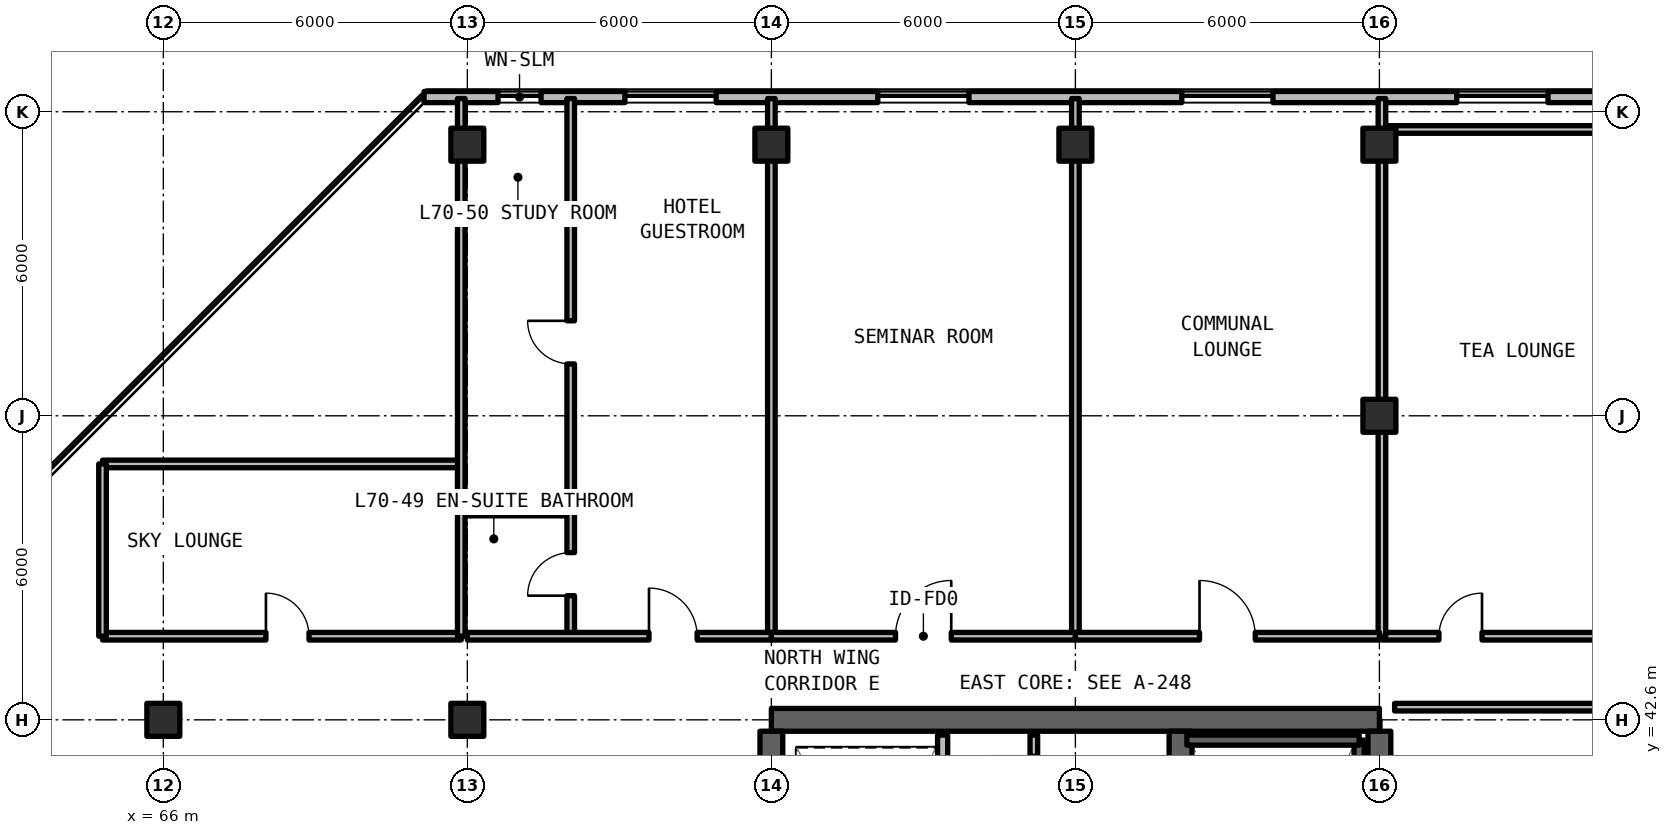
"""IFC4 building model, lengths in metres.
Left out: names, types, materials, properties, quantities, classifications, styles, units other than length and angle.
Written with IfcOpenShell. Run it as: python <this file> out.ifc"""

import sys

from ifc_helpers import new_model, si_unit, direction, frame, frame_2d, origin, origin_2d, place, context, subcontext, project, spatial, rectangle, extrude, element, fill, save


model = new_model("IFC4")
c1 = context("Model", 3, precision=1e-05, world=origin(), true_north=direction((0.0, 1.0)))
c2 = subcontext(c1, "Body", "Model", "MODEL_VIEW")
j1 = project(units=[si_unit("LENGTHUNIT", "METRE"), si_unit("PLANEANGLEUNIT", "RADIAN")], contexts=[c1])
p1 = place(None, origin())
s1 = spatial("IfcSite", under=j1, at=p1, CompositionType="ELEMENT")
p2 = place(p1, origin())
s2 = spatial("IfcBuilding", under=s1, at=p2, CompositionType="ELEMENT")
p3 = place(p2, frame((0.0, 0.0, 249.81)))
s3 = spatial("IfcBuildingStorey", under=s2, at=p3, CompositionType="ELEMENT", Elevation=249.81)
p4 = place(p3, frame((90.0, 42.6, 0.0), z_axis=(0.0, 0.0, 1.0), x_axis=(-1.0, 0.0, 0.0)))
e1 = element("IfcWall", 1, at=p4, inside=s3, PredefinedType="SHEAR", context=c2, shape_type="SweptSolid", body=[
    extrude(rectangle(XDim=12.0, YDim=0.45, at=frame_2d((6.0, 0.0))), origin(), (0.0, 0.0, 1.0), 3.63),
])
p5 = place(p3, frame((90.0, 24.825, 0.0), z_axis=(0.0, 0.0, 1.0), x_axis=(0.0, 1.0, 0.0)))
e2 = element("IfcWall", 2, at=p5, inside=s3, PredefinedType="SHEAR", context=c2, shape_type="SweptSolid", body=[
    extrude(rectangle(XDim=17.55, YDim=0.45, at=frame_2d((8.775, 0.0))), origin(), (0.0, 0.0, 1.0), 3.63),
])
p6 = place(p3, frame((78.0, 36.8, 0.0), z_axis=(0.0, 0.0, 1.0), x_axis=(0.0, 1.0, 0.0)))
e3 = element("IfcWall", 3, at=p6, inside=s3, PredefinedType="SHEAR", context=c2, shape_type="SweptSolid", body=[
    extrude(rectangle(XDim=5.575, YDim=0.45, at=frame_2d((2.788, 0.0))), origin(), (0.0, 0.0, 1.0), 3.63),
])
p7 = place(p3, frame((86.075, 24.825, 0.0), z_axis=(0.0, 0.0, 1.0), x_axis=(0.0, 1.0, 0.0)))
e4 = element("IfcWall", 4, at=p7, inside=s3, PredefinedType="SHEAR", context=c2, shape_type="SweptSolid", body=[
    extrude(rectangle(XDim=17.55, YDim=0.45, at=frame_2d((8.775, 0.0))), origin(), (0.0, 0.0, 1.0), 3.63),
])
p8 = place(p7, frame((0.425, 0.0, 0.0)))
e5 = element("IfcOpeningElement", 5, at=p8, cuts=e4, PredefinedType="OPENING", context=c2, shape_type="SweptSolid", body=[
    extrude(rectangle(XDim=1.15, YDim=2.15, at=frame_2d((0.575, 1.075))), frame((0.0, 0.235, 0.0), z_axis=(0.0, -1.0, 0.0), x_axis=(1.0, 0.0, 0.0)), (0.0, 0.0, 1.0), 0.47),
])
p9 = place(p7, frame((9.625, 0.0, 0.0)))
e6 = element("IfcOpeningElement", 6, at=p9, cuts=e4, PredefinedType="OPENING", context=c2, shape_type="SweptSolid", body=[
    extrude(rectangle(XDim=1.15, YDim=2.15, at=frame_2d((0.575, 1.075))), frame((0.0, 0.235, 0.0), z_axis=(0.0, -1.0, 0.0), x_axis=(1.0, 0.0, 0.0)), (0.0, 0.0, 1.0), 0.47),
])
for number, where, z_axis, x_axis in (
    (7, (66.0, 42.6, 0.0), (0.0, 0.0, 1.0), (1.0, 0.0, 0.0)),
    (8, (72.0, 42.6, 0.0), (0.0, 0.0, 1.0), (1.0, 0.0, 0.0)),
    (9, (90.0, 48.6, 0.0), (0.0, 0.0, 1.0), (1.0, 0.0, 0.0)),
    (10, (72.0, 53.95, 0.0), (0.0, 0.0, 1.0), (1.0, 0.0, 0.0)),
    (11, (78.0, 53.95, 0.0), (0.0, 0.0, 1.0), (1.0, 0.0, 0.0)),
    (12, (84.0, 53.95, 0.0), (0.0, 0.0, 1.0), (1.0, 0.0, 0.0)),
    (13, (90.0, 53.95, 0.0), (0.0, 0.0, 1.0), (1.0, 0.0, 0.0)),
):
    element("IfcColumn", number, at=place(p3, frame(where, z_axis=z_axis, x_axis=x_axis)), inside=s3, PredefinedType="COLUMN", context=c2, shape_type="SweptSolid", body=[
        extrude(rectangle(XDim=0.65, YDim=0.65, at=origin_2d()), origin(), (0.0, 0.0, 1.0), 3.63),
    ])
p10 = place(p3, frame((94.754, 54.89, 0.0), z_axis=(0.0, 0.0, 1.0), x_axis=(-1.0, 0.0, 0.0)))
e14 = element("IfcWall", 14, at=p10, inside=s3, PredefinedType="SOLIDWALL", context=c2, shape_type="SweptSolid", body=[
    extrude(rectangle(XDim=23.609, YDim=0.22, at=frame_2d((11.804, 0.0))), origin(), (0.0, 0.0, 1.0), 3.41),
])
p11 = place(p10, frame((1.427, 0.0, 0.78)))
e15 = element("IfcOpeningElement", 15, at=p11, cuts=e14, PredefinedType="OPENING", context=c2, shape_type="SweptSolid", body=[
    extrude(rectangle(XDim=1.8, YDim=1.66, at=frame_2d((0.9, 0.83))), frame((0.0, 0.12, 0.0), z_axis=(0.0, -1.0, 0.0), x_axis=(1.0, 0.0, 0.0)), (0.0, 0.0, 1.0), 0.24),
])
p12 = place(p10, frame((21.299, 0.0, 0.78)))
e16 = element("IfcOpeningElement", 16, at=p12, cuts=e14, PredefinedType="OPENING", context=c2, shape_type="SweptSolid", body=[
    extrude(rectangle(XDim=0.85, YDim=1.65, at=frame_2d((0.425, 0.825))), frame((0.0, 0.12, 0.0), z_axis=(0.0, -1.0, 0.0), x_axis=(1.0, 0.0, 0.0)), (0.0, 0.0, 1.0), 0.24),
])
p13 = place(p10, frame((17.844, 0.0, 0.78)))
e17 = element("IfcOpeningElement", 17, at=p13, cuts=e14, PredefinedType="OPENING", context=c2, shape_type="SweptSolid", body=[
    extrude(rectangle(XDim=1.8, YDim=1.66, at=frame_2d((0.9, 0.83))), frame((0.0, 0.12, 0.0), z_axis=(0.0, -1.0, 0.0), x_axis=(1.0, 0.0, 0.0)), (0.0, 0.0, 1.0), 0.24),
])
p14 = place(p10, frame((12.854, 0.0, 0.78)))
e18 = element("IfcOpeningElement", 18, at=p14, cuts=e14, PredefinedType="OPENING", context=c2, shape_type="SweptSolid", body=[
    extrude(rectangle(XDim=1.8, YDim=1.66, at=frame_2d((0.9, 0.83))), frame((0.0, 0.12, 0.0), z_axis=(0.0, -1.0, 0.0), x_axis=(1.0, 0.0, 0.0)), (0.0, 0.0, 1.0), 0.24),
])
p15 = place(p10, frame((6.854, 0.0, 0.78)))
e19 = element("IfcOpeningElement", 19, at=p15, cuts=e14, PredefinedType="OPENING", context=c2, shape_type="SweptSolid", body=[
    extrude(rectangle(XDim=1.8, YDim=1.66, at=frame_2d((0.9, 0.83))), frame((0.0, 0.12, 0.0), z_axis=(0.0, -1.0, 0.0), x_axis=(1.0, 0.0, 0.0)), (0.0, 0.0, 1.0), 0.24),
])
p16 = place(p3, frame((83.18, 36.88, 0.0), z_axis=(0.0, 0.0, 1.0), x_axis=(0.0, 1.0, 0.0)))
e20 = element("IfcWall", 20, at=p16, inside=s3, PredefinedType="SOLIDWALL", context=c2, shape_type="SweptSolid", body=[
    extrude(rectangle(XDim=5.42, YDim=0.15, at=frame_2d((2.71, 0.0))), origin(), (0.0, 0.0, 1.0), 2.63),
])
p17 = place(p16, frame((1.15, 0.0, 0.0)))
e21 = element("IfcOpeningElement", 21, at=p17, cuts=e20, PredefinedType="OPENING", context=c2, shape_type="SweptSolid", body=[
    extrude(rectangle(XDim=0.95, YDim=2.15, at=frame_2d((0.475, 1.075))), frame((0.0, 0.085, 0.0), z_axis=(0.0, -1.0, 0.0), x_axis=(1.0, 0.0, 0.0)), (0.0, 0.0, 1.0), 0.17),
])
p18 = place(p16, frame((4.05, 0.0, 0.0)))
e22 = element("IfcOpeningElement", 22, at=p18, cuts=e20, PredefinedType="OPENING", context=c2, shape_type="SweptSolid", body=[
    extrude(rectangle(XDim=0.95, YDim=2.15, at=frame_2d((0.475, 1.075))), frame((0.0, 0.085, 0.0), z_axis=(0.0, -1.0, 0.0), x_axis=(1.0, 0.0, 0.0)), (0.0, 0.0, 1.0), 0.17),
])
p19 = place(p3, frame((81.38, 36.88, 0.0), z_axis=(0.0, 0.0, 1.0), x_axis=(0.0, 1.0, 0.0)))
e23 = element("IfcWall", 23, at=p19, inside=s3, PredefinedType="SOLIDWALL", context=c2, shape_type="SweptSolid", body=[
    extrude(rectangle(XDim=5.42, YDim=0.2, at=frame_2d((2.71, 0.0))), origin(), (0.0, 0.0, 1.0), 2.63),
])
p20 = place(p19, frame((0.8, 0.0, 0.0)))
e24 = element("IfcOpeningElement", 24, at=p20, cuts=e23, PredefinedType="OPENING", context=c2, shape_type="SweptSolid", body=[
    extrude(rectangle(XDim=1.1, YDim=2.2, at=frame_2d((0.55, 1.1))), frame((0.0, 0.11, 0.0), z_axis=(0.0, -1.0, 0.0), x_axis=(1.0, 0.0, 0.0)), (0.0, 0.0, 1.0), 0.22),
])
p21 = place(p19, frame((3.3, 0.0, 0.0)))
e25 = element("IfcOpeningElement", 25, at=p21, cuts=e23, PredefinedType="OPENING", context=c2, shape_type="SweptSolid", body=[
    extrude(rectangle(XDim=1.1, YDim=2.2, at=frame_2d((0.55, 1.1))), frame((0.0, 0.11, 0.0), z_axis=(0.0, -1.0, 0.0), x_axis=(1.0, 0.0, 0.0)), (0.0, 0.0, 1.0), 0.22),
])
p22 = place(p3, frame((64.8, 44.25, 0.0), z_axis=(0.0, 0.0, 1.0), x_axis=(1.0, 0.0, 0.0)))
e26 = element("IfcWall", 26, at=p22, inside=s3, PredefinedType="SOLIDWALL", context=c2, shape_type="SweptSolid", body=[
    extrude(rectangle(XDim=7.08, YDim=0.15, at=frame_2d((3.54, 0.0))), origin(), (0.0, 0.0, 1.0), 2.63),
])
p23 = place(p22, frame((3.225, 0.0, 0.0)))
e27 = element("IfcOpeningElement", 27, at=p23, cuts=e26, PredefinedType="OPENING", context=c2, shape_type="SweptSolid", body=[
    extrude(rectangle(XDim=0.85, YDim=2.1, at=frame_2d((0.425, 1.05))), frame((0.0, 0.085, 0.0), z_axis=(0.0, -1.0, 0.0), x_axis=(1.0, 0.0, 0.0)), (0.0, 0.0, 1.0), 0.17),
])
p24 = place(p3, frame((64.8, 47.65, 0.0), z_axis=(0.0, 0.0, 1.0), x_axis=(1.0, 0.0, 0.0)))
e28 = element("IfcWall", 28, at=p24, inside=s3, PredefinedType="SOLIDWALL", context=c2, shape_type="SweptSolid", body=[
    extrude(rectangle(XDim=7.08, YDim=0.15, at=frame_2d((3.54, 0.0))), origin(), (0.0, 0.0, 1.0), 2.63),
])
p25 = place(p3, frame((64.8, 44.25, 0.0), z_axis=(0.0, 0.0, 1.0), x_axis=(0.0, 1.0, 0.0)))
e29 = element("IfcWall", 29, at=p25, inside=s3, PredefinedType="SOLIDWALL", context=c2, shape_type="SweptSolid", body=[
    extrude(rectangle(XDim=3.4, YDim=0.15, at=frame_2d((1.7, 0.0))), origin(), (0.0, 0.0, 1.0), 2.63),
])
p26 = place(p3, frame((71.88, 44.25, 0.0), z_axis=(0.0, 0.0, 1.0), x_axis=(0.0, 1.0, 0.0)))
e30 = element("IfcWall", 30, at=p26, inside=s3, PredefinedType="SOLIDWALL", context=c2, shape_type="SweptSolid", body=[
    extrude(rectangle(XDim=10.61, YDim=0.15, at=frame_2d((5.305, 0.0))), origin(), (0.0, 0.0, 1.0), 2.63),
])
p27 = place(p3, frame((90.3, 42.85, 0.0), z_axis=(0.0, 0.0, 1.0), x_axis=(1.0, 0.0, 0.0)))
e31 = element("IfcWall", 31, at=p27, inside=s3, PredefinedType="SOLIDWALL", context=c2, shape_type="SweptSolid", body=[
    extrude(rectangle(XDim=8.52, YDim=0.15, at=frame_2d((4.26, 0.0))), origin(), (0.0, 0.0, 1.0), 2.63),
])
p28 = place(p3, frame((90.05, 44.25, 0.0), z_axis=(0.0, 0.0, 1.0), x_axis=(1.0, 0.0, 0.0)))
e32 = element("IfcWall", 32, at=p28, inside=s3, PredefinedType="SOLIDWALL", context=c2, shape_type="SweptSolid", body=[
    extrude(rectangle(XDim=5.37, YDim=0.15, at=frame_2d((2.685, 0.0))), origin(), (0.0, 0.0, 1.0), 2.63),
])
p29 = place(p28, frame((1.125, 0.0, 0.0)))
e33 = element("IfcOpeningElement", 33, at=p29, cuts=e32, PredefinedType="OPENING", context=c2, shape_type="SweptSolid", body=[
    extrude(rectangle(XDim=0.85, YDim=2.1, at=frame_2d((0.425, 1.05))), frame((0.0, 0.085, 0.0), z_axis=(0.0, -1.0, 0.0), x_axis=(1.0, 0.0, 0.0)), (0.0, 0.0, 1.0), 0.17),
])
p30 = place(p3, frame((90.05, 54.25, 0.0), z_axis=(0.0, 0.0, 1.0), x_axis=(1.0, 0.0, 0.0)))
e34 = element("IfcWall", 34, at=p30, inside=s3, PredefinedType="SOLIDWALL", context=c2, shape_type="SweptSolid", body=[
    extrude(rectangle(XDim=5.37, YDim=0.15, at=frame_2d((2.685, 0.0))), origin(), (0.0, 0.0, 1.0), 2.63),
])
for number, where, z_axis, x_axis in (
    (35, (90.05, 44.25, 0.0), (0.0, 0.0, 1.0), (0.0, 1.0, 0.0)),
    (36, (78.0, 44.25, 0.0), (0.0, 0.0, 1.0), (0.0, 1.0, 0.0)),
):
    element("IfcWall", number, at=place(p3, frame(where, z_axis=z_axis, x_axis=x_axis)), inside=s3, PredefinedType="SOLIDWALL", context=c2, shape_type="SweptSolid", body=[
        extrude(rectangle(XDim=10.61, YDim=0.15, at=frame_2d((5.305, 0.0))), origin(), (0.0, 0.0, 1.0), 2.63),
    ])
p31 = place(p3, frame((72.0, 46.7, 0.0), z_axis=(0.0, 0.0, 1.0), x_axis=(1.0, 0.0, 0.0)))
e37 = element("IfcWall", 37, at=p31, inside=s3, PredefinedType="PARTITIONING", context=c2, shape_type="SweptSolid", body=[
    extrude(rectangle(XDim=2.04, YDim=0.15, at=frame_2d((1.02, 0.0))), origin(), (0.0, 0.0, 1.0), 2.63),
])
p32 = place(p3, frame((74.04, 44.25, 0.0), z_axis=(0.0, 0.0, 1.0), x_axis=(0.0, 1.0, 0.0)))
e38 = element("IfcWall", 38, at=p32, inside=s3, PredefinedType="PARTITIONING", context=c2, shape_type="SweptSolid", body=[
    extrude(rectangle(XDim=10.61, YDim=0.15, at=frame_2d((5.305, 0.0))), origin(), (0.0, 0.0, 1.0), 2.63),
])
p33 = place(p32, frame((0.8, 0.0, 0.0)))
e39 = element("IfcOpeningElement", 39, at=p33, cuts=e38, PredefinedType="OPENING", context=c2, shape_type="SweptSolid", body=[
    extrude(rectangle(XDim=0.85, YDim=2.1, at=frame_2d((0.425, 1.05))), frame((0.0, 0.085, 0.0), z_axis=(0.0, -1.0, 0.0), x_axis=(1.0, 0.0, 0.0)), (0.0, 0.0, 1.0), 0.17),
])
p34 = place(p32, frame((5.374, 0.0, 0.0)))
e40 = element("IfcOpeningElement", 40, at=p34, cuts=e38, PredefinedType="OPENING", context=c2, shape_type="SweptSolid", body=[
    extrude(rectangle(XDim=0.85, YDim=2.1, at=frame_2d((0.425, 1.05))), frame((0.0, 0.085, 0.0), z_axis=(0.0, -1.0, 0.0), x_axis=(1.0, 0.0, 0.0)), (0.0, 0.0, 1.0), 0.17),
])
p35 = place(p3, frame((72.0, 44.25, 0.0), z_axis=(0.0, 0.0, 1.0), x_axis=(1.0, 0.0, 0.0)))
e41 = element("IfcWall", 41, at=p35, inside=s3, PredefinedType="SOLIDWALL", context=c2, shape_type="SweptSolid", body=[
    extrude(rectangle(XDim=6.0, YDim=0.15, at=frame_2d((3.0, 0.0))), origin(), (0.0, 0.0, 1.0), 2.63),
])
p36 = place(p35, frame((3.585, 0.0, 0.0)))
e42 = element("IfcOpeningElement", 42, at=p36, cuts=e41, PredefinedType="OPENING", context=c2, shape_type="SweptSolid", body=[
    extrude(rectangle(XDim=0.95, YDim=2.15, at=frame_2d((0.475, 1.075))), frame((0.0, 0.085, 0.0), z_axis=(0.0, -1.0, 0.0), x_axis=(1.0, 0.0, 0.0)), (0.0, 0.0, 1.0), 0.17),
])
p37 = place(p3, frame((84.0, 44.25, 0.0), z_axis=(0.0, 0.0, 1.0), x_axis=(0.0, 1.0, 0.0)))
e43 = element("IfcWall", 43, at=p37, inside=s3, PredefinedType="SOLIDWALL", context=c2, shape_type="SweptSolid", body=[
    extrude(rectangle(XDim=10.61, YDim=0.15, at=frame_2d((5.305, 0.0))), origin(), (0.0, 0.0, 1.0), 2.63),
])
p38 = place(p3, frame((78.0, 44.25, 0.0), z_axis=(0.0, 0.0, 1.0), x_axis=(1.0, 0.0, 0.0)))
e44 = element("IfcWall", 44, at=p38, inside=s3, PredefinedType="SOLIDWALL", context=c2, shape_type="SweptSolid", body=[
    extrude(rectangle(XDim=6.0, YDim=0.15, at=frame_2d((3.0, 0.0))), origin(), (0.0, 0.0, 1.0), 2.63),
])
p39 = place(p38, frame((2.45, 0.0, 0.0)))
e45 = element("IfcOpeningElement", 45, at=p39, cuts=e44, PredefinedType="OPENING", context=c2, shape_type="SweptSolid", body=[
    extrude(rectangle(XDim=1.1, YDim=2.15, at=frame_2d((0.55, 1.075))), frame((0.0, 0.085, 0.0), z_axis=(0.0, -1.0, 0.0), x_axis=(1.0, 0.0, 0.0)), (0.0, 0.0, 1.0), 0.17),
])
p40 = place(p3, frame((84.0, 44.25, 0.0), z_axis=(0.0, 0.0, 1.0), x_axis=(1.0, 0.0, 0.0)))
e46 = element("IfcWall", 46, at=p40, inside=s3, PredefinedType="SOLIDWALL", context=c2, shape_type="SweptSolid", body=[
    extrude(rectangle(XDim=6.0, YDim=0.15, at=frame_2d((3.0, 0.0))), origin(), (0.0, 0.0, 1.0), 2.63),
])
p41 = place(p40, frame((2.45, 0.0, 0.0)))
e47 = element("IfcOpeningElement", 47, at=p41, cuts=e46, PredefinedType="OPENING", context=c2, shape_type="SweptSolid", body=[
    extrude(rectangle(XDim=1.1, YDim=2.15, at=frame_2d((0.55, 1.075))), frame((0.0, 0.085, 0.0), z_axis=(0.0, -1.0, 0.0), x_axis=(1.0, 0.0, 0.0)), (0.0, 0.0, 1.0), 0.17),
])
p42 = place(p3, frame((89.6, 34.2, 0.0), z_axis=(0.0, 0.0, 1.0), x_axis=(0.0, 1.0, 0.0)))
e48 = element("IfcWall", 48, at=p42, inside=s3, PredefinedType="SOLIDWALL", context=c2, shape_type="SweptSolid", body=[
    extrude(rectangle(XDim=8.0, YDim=0.2, at=frame_2d((4.0, 0.0))), origin(), (0.0, 0.0, 1.0), 3.63),
])
p43 = place(p3, frame((89.6, 42.2, 0.0), z_axis=(0.0, 0.0, 1.0), x_axis=(-1.0, 0.0, 0.0)))
e49 = element("IfcWall", 49, at=p43, inside=s3, PredefinedType="SOLIDWALL", context=c2, shape_type="SweptSolid", body=[
    extrude(rectangle(XDim=3.4, YDim=0.2, at=frame_2d((1.7, 0.0))), origin(), (0.0, 0.0, 1.0), 3.63),
])
p44 = place(p11, origin())
e50 = element("IfcWindow", 50, at=p44, inside=s3, PartitioningType="SINGLE_PANEL", PredefinedType="WINDOW", context=c2, shape_type="SweptSolid", body=[
    extrude(rectangle(XDim=1.8, YDim=1.66, at=frame_2d((0.9, 0.83))), frame((0.0, 0.03, 0.0), z_axis=(0.0, -1.0, 0.0), x_axis=(1.0, 0.0, 0.0)), (0.0, 0.0, 1.0), 0.06),
])
fill(e15, e50)
p45 = place(p12, origin())
e51 = element("IfcWindow", 51, at=p45, inside=s3, PartitioningType="SINGLE_PANEL", PredefinedType="WINDOW", context=c2, shape_type="SweptSolid", body=[
    extrude(rectangle(XDim=0.85, YDim=1.65, at=frame_2d((0.425, 0.825))), frame((0.0, 0.03, 0.0), z_axis=(0.0, -1.0, 0.0), x_axis=(1.0, 0.0, 0.0)), (0.0, 0.0, 1.0), 0.06),
])
fill(e16, e51)
p46 = place(p13, origin())
e52 = element("IfcWindow", 52, at=p46, inside=s3, PartitioningType="SINGLE_PANEL", PredefinedType="WINDOW", context=c2, shape_type="SweptSolid", body=[
    extrude(rectangle(XDim=1.8, YDim=1.66, at=frame_2d((0.9, 0.83))), frame((0.0, 0.03, 0.0), z_axis=(0.0, -1.0, 0.0), x_axis=(1.0, 0.0, 0.0)), (0.0, 0.0, 1.0), 0.06),
])
fill(e17, e52)
p47 = place(p14, origin())
e53 = element("IfcWindow", 53, at=p47, inside=s3, PartitioningType="SINGLE_PANEL", PredefinedType="WINDOW", context=c2, shape_type="SweptSolid", body=[
    extrude(rectangle(XDim=1.8, YDim=1.66, at=frame_2d((0.9, 0.83))), frame((0.0, 0.03, 0.0), z_axis=(0.0, -1.0, 0.0), x_axis=(1.0, 0.0, 0.0)), (0.0, 0.0, 1.0), 0.06),
])
fill(e18, e53)
p48 = place(p15, origin())
e54 = element("IfcWindow", 54, at=p48, inside=s3, PartitioningType="SINGLE_PANEL", PredefinedType="WINDOW", context=c2, shape_type="SweptSolid", body=[
    extrude(rectangle(XDim=1.8, YDim=1.66, at=frame_2d((0.9, 0.83))), frame((0.0, 0.03, 0.0), z_axis=(0.0, -1.0, 0.0), x_axis=(1.0, 0.0, 0.0)), (0.0, 0.0, 1.0), 0.06),
])
fill(e19, e54)
p49 = place(p23, origin())
e55 = element("IfcDoor", 55, at=p49, inside=s3, OperationType="SINGLE_SWING_LEFT", PredefinedType="DOOR", context=c2, shape_type="SweptSolid", body=[
    extrude(rectangle(XDim=0.85, YDim=2.1, at=frame_2d((0.425, 1.05))), frame((0.0, 0.025, 0.0), z_axis=(0.0, -1.0, 0.0), x_axis=(1.0, 0.0, 0.0)), (0.0, 0.0, 1.0), 0.05),
])
fill(e27, e55)
p50 = place(p29, origin())
e56 = element("IfcDoor", 56, at=p50, inside=s3, OperationType="SINGLE_SWING_RIGHT", PredefinedType="DOOR", context=c2, shape_type="SweptSolid", body=[
    extrude(rectangle(XDim=0.85, YDim=2.1, at=frame_2d((0.425, 1.05))), frame((0.0, 0.025, 0.0), z_axis=(0.0, -1.0, 0.0), x_axis=(1.0, 0.0, 0.0)), (0.0, 0.0, 1.0), 0.05),
])
fill(e33, e56)
p51 = place(p33, origin())
e57 = element("IfcDoor", 57, at=p51, inside=s3, OperationType="SINGLE_SWING_LEFT", PredefinedType="DOOR", context=c2, shape_type="SweptSolid", body=[
    extrude(rectangle(XDim=0.85, YDim=2.1, at=frame_2d((0.425, 1.05))), frame((0.0, 0.025, 0.0), z_axis=(0.0, -1.0, 0.0), x_axis=(1.0, 0.0, 0.0)), (0.0, 0.0, 1.0), 0.05),
])
fill(e39, e57)
p52 = place(p34, origin())
e58 = element("IfcDoor", 58, at=p52, inside=s3, OperationType="SINGLE_SWING_RIGHT", PredefinedType="DOOR", context=c2, shape_type="SweptSolid", body=[
    extrude(rectangle(XDim=0.85, YDim=2.1, at=frame_2d((0.425, 1.05))), frame((0.0, 0.025, 0.0), z_axis=(0.0, -1.0, 0.0), x_axis=(1.0, 0.0, 0.0)), (0.0, 0.0, 1.0), 0.05),
])
fill(e40, e58)
p53 = place(p36, origin())
e59 = element("IfcDoor", 59, at=p53, inside=s3, OperationType="SINGLE_SWING_LEFT", PredefinedType="DOOR", context=c2, shape_type="SweptSolid", body=[
    extrude(rectangle(XDim=0.95, YDim=2.15, at=frame_2d((0.475, 1.075))), frame((0.0, 0.025, 0.0), z_axis=(0.0, -1.0, 0.0), x_axis=(1.0, 0.0, 0.0)), (0.0, 0.0, 1.0), 0.05),
])
fill(e42, e59)
p54 = place(p39, origin())
e60 = element("IfcDoor", 60, at=p54, inside=s3, OperationType="SINGLE_SWING_RIGHT", PredefinedType="DOOR", context=c2, shape_type="SweptSolid", body=[
    extrude(rectangle(XDim=1.1, YDim=2.15, at=frame_2d((0.55, 1.075))), frame((0.0, 0.025, 0.0), z_axis=(0.0, -1.0, 0.0), x_axis=(1.0, 0.0, 0.0)), (0.0, 0.0, 1.0), 0.05),
])
fill(e45, e60)
p55 = place(p41, origin())
e61 = element("IfcDoor", 61, at=p55, inside=s3, OperationType="SINGLE_SWING_LEFT", PredefinedType="DOOR", context=c2, shape_type="SweptSolid", body=[
    extrude(rectangle(XDim=1.1, YDim=2.15, at=frame_2d((0.55, 1.075))), frame((0.0, 0.025, 0.0), z_axis=(0.0, -1.0, 0.0), x_axis=(1.0, 0.0, 0.0)), (0.0, 0.0, 1.0), 0.05),
])
fill(e47, e61)
save(model, sys.argv[1])
